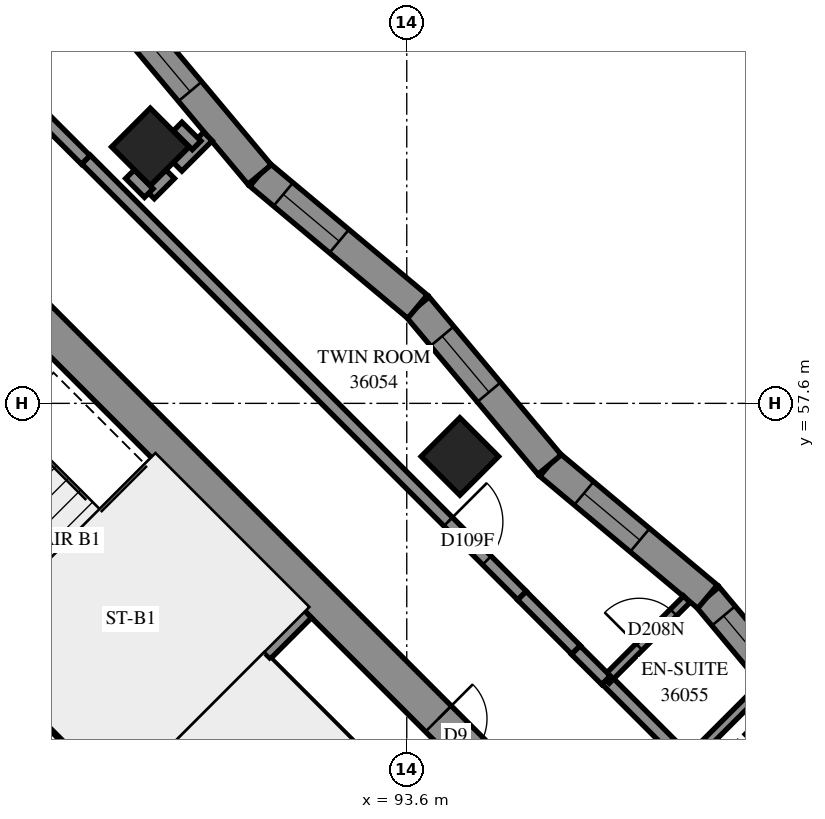
"""IFC4 building model, lengths in metres.
Left out: names, types, materials, properties, quantities, classifications, styles, units other than length and angle.
Written with IfcOpenShell. Run it as: python <this file> out.ifc"""

import sys

from ifc_helpers import new_model, si_unit, direction, frame, frame_2d, origin, origin_2d, place, context, subcontext, project, spatial, polyline, rectangle, outline, extrude, element, fill, save


model = new_model("IFC4")
c1 = context("Model", 3, precision=1e-05, world=origin(), true_north=direction((0.0, 1.0)))
c2 = subcontext(c1, "Body", "Model", "MODEL_VIEW")
j1 = project(units=[si_unit("LENGTHUNIT", "METRE"), si_unit("PLANEANGLEUNIT", "RADIAN")], contexts=[c1])
p1 = place(None, origin())
s1 = spatial("IfcSite", under=j1, at=p1, CompositionType="ELEMENT")
p2 = place(p1, origin())
s2 = spatial("IfcBuilding", under=s1, at=p2, CompositionType="ELEMENT")
p3 = place(p2, frame((0.0, 0.0, 135.4)))
s3 = spatial("IfcBuildingStorey", under=s2, at=p3, CompositionType="ELEMENT", Elevation=135.4)
for number, where, z_axis, x_axis in (
    (1, (89.382, 61.818, 0.0), (0.0, 0.0, 1.0), (0.707, -0.707, 0.0)),
    (2, (94.474, 56.727, 0.0), (0.0, 0.0, 1.0), (0.707, -0.707, 0.0)),
    (3, (99.565, 51.635, 0.0), (0.0, 0.0, 1.0), (0.707, -0.707, 0.0)),
):
    element("IfcColumn", number, at=place(p3, frame(where, z_axis=z_axis, x_axis=x_axis)), inside=s3, PredefinedType="COLUMN", context=c2, shape_type="SweptSolid", body=[
        extrude(rectangle(XDim=0.9, YDim=0.9, at=origin_2d()), origin(), (0.0, 0.0, 1.0), 3.1),
    ])
p4 = place(p3, frame((86.625, 59.908, -0.3), z_axis=(0.0, 0.0, 1.0), x_axis=(0.7071067812, -0.7071067812, 0.0)))
e4 = element("IfcWall", 4, at=p4, inside=s3, PredefinedType="SHEAR", context=c2, shape_type="SweptSolid", body=[
    extrude(rectangle(XDim=15.6, YDim=0.6, at=frame_2d((7.8, 0.0))), origin(), (0.0, 0.0, 1.0), 2.7),
])
p5 = place(p4, frame((10.6, 0.0, 0.3)))
e5 = element("IfcOpeningElement", 5, at=p5, cuts=e4, PredefinedType="OPENING", context=c2, shape_type="SweptSolid", body=[
    extrude(rectangle(XDim=0.8, YDim=2.1, at=frame_2d((0.4, 1.05))), frame((0.0, 0.31, 0.0), z_axis=(0.0, -1.0, 0.0), x_axis=(1.0, 0.0, 0.0)), (0.0, 0.0, 1.0), 0.62),
])
p6 = place(p3, frame((81.534, 53.969, 0.0), z_axis=(0.0, 0.0, 1.0), x_axis=(0.707103309, -0.7071102534, 0.0)))
e6 = element("IfcWall", 6, at=p6, inside=s3, PredefinedType="SOLIDWALL", context=c2, shape_type="SweptSolid", body=[
    extrude(rectangle(XDim=14.4, YDim=0.3, at=frame_2d((7.2, 0.0))), origin(), (0.0, 0.0, 1.0), 3.1),
])
p7 = place(p6, frame((1.25, 0.0, 0.0)))
e7 = element("IfcOpeningElement", 7, at=p7, cuts=e6, PredefinedType="OPENING", context=c2, shape_type="SweptSolid", body=[
    extrude(rectangle(XDim=1.1, YDim=2.1, at=frame_2d((0.55, 1.05))), frame((0.0, 0.16, 0.0), z_axis=(0.0, -1.0, 0.0), x_axis=(1.0, 0.0, 0.0)), (0.0, 0.0, 1.0), 0.32),
])
p8 = place(p6, frame((4.85, 0.0, 0.0)))
e8 = element("IfcOpeningElement", 8, at=p8, cuts=e6, PredefinedType="OPENING", context=c2, shape_type="SweptSolid", body=[
    extrude(rectangle(XDim=1.1, YDim=2.1, at=frame_2d((0.55, 1.05))), frame((0.0, 0.16, 0.0), z_axis=(0.0, -1.0, 0.0), x_axis=(1.0, 0.0, 0.0)), (0.0, 0.0, 1.0), 0.32),
])
p9 = place(p6, frame((8.45, 0.0, 0.0)))
e9 = element("IfcOpeningElement", 9, at=p9, cuts=e6, PredefinedType="OPENING", context=c2, shape_type="SweptSolid", body=[
    extrude(rectangle(XDim=1.1, YDim=2.1, at=frame_2d((0.55, 1.05))), frame((0.0, 0.16, 0.0), z_axis=(0.0, -1.0, 0.0), x_axis=(1.0, 0.0, 0.0)), (0.0, 0.0, 1.0), 0.32),
])
p10 = place(p6, frame((12.05, 0.0, 0.0)))
e10 = element("IfcOpeningElement", 10, at=p10, cuts=e6, PredefinedType="OPENING", context=c2, shape_type="SweptSolid", body=[
    extrude(rectangle(XDim=1.1, YDim=2.1, at=frame_2d((0.55, 1.05))), frame((0.0, 0.16, 0.0), z_axis=(0.0, -1.0, 0.0), x_axis=(1.0, 0.0, 0.0)), (0.0, 0.0, 1.0), 0.32),
])
p11 = place(p3, frame((83.867, 56.302, 0.0), z_axis=(0.0, 0.0, 1.0), x_axis=(0.7071137256, -0.7070998367, 0.0)))
e11 = element("IfcWall", 11, at=p11, inside=s3, PredefinedType="SOLIDWALL", context=c2, shape_type="SweptSolid", body=[
    extrude(rectangle(XDim=7.2, YDim=0.3, at=frame_2d((3.6, 0.0))), origin(), (0.0, 0.0, 1.0), 3.1),
])
p12 = place(p3, frame((88.958, 51.211, 0.0), z_axis=(0.0, 0.0, 1.0), x_axis=(0.7071067812, 0.7071067812, 0.0)))
e12 = element("IfcWall", 12, at=p12, inside=s3, PredefinedType="SOLIDWALL", context=c2, shape_type="SweptSolid", body=[
    extrude(rectangle(XDim=4.2, YDim=0.3, at=frame_2d((2.1, 0.0))), origin(), (0.0, 0.0, 1.0), 3.1),
])
p13 = place(p3, frame((100.718, 51.824, 0.0), z_axis=(0.0, 0.0, 1.0), x_axis=(-0.6416676788, 0.7669827834, 0.0)))
e13 = element("IfcWall", 13, at=p13, inside=s3, PredefinedType="SOLIDWALL", context=c2, shape_type="SweptSolid", body=[
    extrude(outline(polyline([(0.022, -0.25), (3.408, -0.25), (3.364, 0.25), (-0.022, 0.25), (0.022, -0.25)])), origin(), (0.0, 0.0, 1.0), 3.1),
])
p14 = place(p13, frame((1.774, 0.0, 0.45)))
e14 = element("IfcOpeningElement", 14, at=p14, cuts=e13, PredefinedType="OPENING", context=c2, shape_type="SweptSolid", body=[
    extrude(rectangle(XDim=1.2, YDim=2.5, at=frame_2d((0.6, 1.25))), frame((0.0, 0.26, 0.0), z_axis=(0.0, -1.0, 0.0), x_axis=(1.0, 0.0, 0.0)), (0.0, 0.0, 1.0), 0.52),
])
p15 = place(p3, frame((98.546, 54.421, 0.0), z_axis=(0.0, 0.0, 1.0), x_axis=(-0.7669706225, 0.6416822144, 0.0)))
e15 = element("IfcWall", 15, at=p15, inside=s3, PredefinedType="SOLIDWALL", context=c2, shape_type="SweptSolid", body=[
    extrude(outline(polyline([(-0.022, -0.25), (3.364, -0.25), (3.408, 0.25), (0.022, 0.25), (-0.022, -0.25)])), origin(), (0.0, 0.0, 1.0), 3.1),
])
p16 = place(p15, frame((1.45, 0.0, 0.45)))
e16 = element("IfcOpeningElement", 16, at=p16, cuts=e15, PredefinedType="OPENING", context=c2, shape_type="SweptSolid", body=[
    extrude(rectangle(XDim=1.2, YDim=2.5, at=frame_2d((0.6, 1.25))), frame((0.0, 0.26, 0.0), z_axis=(0.0, -1.0, 0.0), x_axis=(1.0, 0.0, 0.0)), (0.0, 0.0, 1.0), 0.52),
])
p17 = place(p3, frame((95.949, 56.593, 0.0), z_axis=(0.0, 0.0, 1.0), x_axis=(-0.6416822144, 0.7669706225, 0.0)))
e17 = element("IfcWall", 17, at=p17, inside=s3, PredefinedType="SOLIDWALL", context=c2, shape_type="SweptSolid", body=[
    extrude(outline(polyline([(0.022, -0.25), (3.408, -0.25), (3.364, 0.25), (-0.022, 0.25), (0.022, -0.25)])), origin(), (0.0, 0.0, 1.0), 3.1),
])
p18 = place(p17, frame((1.553, 0.0, 0.45)))
e18 = element("IfcOpeningElement", 18, at=p18, cuts=e17, PredefinedType="OPENING", context=c2, shape_type="SweptSolid", body=[
    extrude(rectangle(XDim=1.2, YDim=2.5, at=frame_2d((0.6, 1.25))), frame((0.0, 0.26, 0.0), z_axis=(0.0, -1.0, 0.0), x_axis=(1.0, 0.0, 0.0)), (0.0, 0.0, 1.0), 0.52),
])
p19 = place(p3, frame((93.776, 59.19, 0.0), z_axis=(0.0, 0.0, 1.0), x_axis=(-0.7669706225, 0.6416822144, 0.0)))
e19 = element("IfcWall", 19, at=p19, inside=s3, PredefinedType="SOLIDWALL", context=c2, shape_type="SweptSolid", body=[
    extrude(outline(polyline([(-0.022, -0.25), (3.364, -0.25), (3.408, 0.25), (0.022, 0.25), (-0.022, -0.25)])), origin(), (0.0, 0.0, 1.0), 3.1),
])
p20 = place(p19, frame((1.678, 0.0, 0.45)))
e20 = element("IfcOpeningElement", 20, at=p20, cuts=e19, PredefinedType="OPENING", context=c2, shape_type="SweptSolid", body=[
    extrude(rectangle(XDim=1.2, YDim=2.5, at=frame_2d((0.6, 1.25))), frame((0.0, 0.26, 0.0), z_axis=(0.0, -1.0, 0.0), x_axis=(1.0, 0.0, 0.0)), (0.0, 0.0, 1.0), 0.52),
])
p21 = place(p3, frame((91.18, 61.363, 0.0), z_axis=(0.0, 0.0, 1.0), x_axis=(-0.6416822144, 0.7669706225, 0.0)))
e21 = element("IfcWall", 21, at=p21, inside=s3, PredefinedType="SOLIDWALL", context=c2, shape_type="SweptSolid", body=[
    extrude(outline(polyline([(0.022, -0.25), (3.408, -0.25), (3.364, 0.25), (-0.022, 0.25), (0.022, -0.25)])), origin(), (0.0, 0.0, 1.0), 3.1),
])
p22 = place(p21, frame((1.781, 0.0, 0.45)))
e22 = element("IfcOpeningElement", 22, at=p22, cuts=e21, PredefinedType="OPENING", context=c2, shape_type="SweptSolid", body=[
    extrude(rectangle(XDim=1.2, YDim=2.5, at=frame_2d((0.6, 1.25))), frame((0.0, 0.26, 0.0), z_axis=(0.0, -1.0, 0.0), x_axis=(1.0, 0.0, 0.0)), (0.0, 0.0, 1.0), 0.52),
])
p23 = place(p3, frame((91.313, 53.354, 0.0), z_axis=(0.0, 0.0, 1.0), x_axis=(0.7071140275, -0.7070995348, 0.0)))
e23 = element("IfcWall", 23, at=p23, inside=s3, PredefinedType="PARTITIONING", context=c2, shape_type="SweptSolid", body=[
    extrude(rectangle(XDim=6.9, YDim=0.15, at=frame_2d((3.45, 0.0))), origin(), (0.0, 0.0, 1.0), 3.1),
])
p24 = place(p3, frame((88.326, 61.609, 0.0), z_axis=(0.0, 0.0, 1.0), x_axis=(0.7071067812, -0.7071067812, 0.0)))
e24 = element("IfcWall", 24, at=p24, inside=s3, PredefinedType="PARTITIONING", context=c2, shape_type="SweptSolid", body=[
    extrude(rectangle(XDim=10.14, YDim=0.2, at=frame_2d((5.07, 0.0))), origin(), (0.0, 0.0, 1.0), 3.1),
])
p25 = place(p24, frame((8.422, 0.0, 0.0)))
e25 = element("IfcOpeningElement", 25, at=p25, cuts=e24, PredefinedType="OPENING", context=c2, shape_type="SweptSolid", body=[
    extrude(rectangle(XDim=0.9, YDim=2.1, at=frame_2d((0.45, 1.05))), frame((0.0, 0.11, 0.0), z_axis=(0.0, -1.0, 0.0), x_axis=(1.0, 0.0, 0.0)), (0.0, 0.0, 1.0), 0.22),
])
p26 = place(p3, frame((86.834, 63.088, 0.0), z_axis=(0.0, 0.0, 1.0), x_axis=(0.7075827869, -0.7066304548, 0.0)))
e26 = element("IfcWall", 26, at=p26, inside=s3, PredefinedType="PARTITIONING", context=c2, shape_type="SweptSolid", body=[
    extrude(rectangle(XDim=2.1, YDim=0.2, at=frame_2d((1.05, 0.0))), origin(), (0.0, 0.0, 1.0), 3.1),
])
p27 = place(p3, frame((96.882, 53.053, 0.0), z_axis=(0.0, 0.0, 1.0), x_axis=(0.7071067812, -0.7071067812, 0.0)))
e27 = element("IfcWall", 27, at=p27, inside=s3, PredefinedType="PARTITIONING", context=c2, shape_type="SweptSolid", body=[
    extrude(rectangle(XDim=1.901, YDim=0.2, at=frame_2d((0.95, 0.0))), origin(), (0.0, 0.0, 1.0), 3.1),
])
p28 = place(p3, frame((96.877, 53.051, 0.0), z_axis=(0.0, 0.0, 1.0), x_axis=(0.7071333947, 0.7070801667, 0.0)))
e28 = element("IfcWall", 28, at=p28, inside=s3, PredefinedType="PARTITIONING", context=c2, shape_type="SweptSolid", body=[
    extrude(rectangle(XDim=1.879, YDim=0.15, at=frame_2d((0.939, 0.0))), origin(), (0.0, 0.0, 1.0), 3.1),
])
p29 = place(p28, frame((0.77, 0.0, 0.0)))
e29 = element("IfcOpeningElement", 29, at=p29, cuts=e28, PredefinedType="OPENING", context=c2, shape_type="SweptSolid", body=[
    extrude(rectangle(XDim=0.8, YDim=2.1, at=frame_2d((0.4, 1.05))), frame((0.0, 0.085, 0.0), z_axis=(0.0, -1.0, 0.0), x_axis=(1.0, 0.0, 0.0)), (0.0, 0.0, 1.0), 0.17),
])
p30 = place(p3, frame((98.221, 51.707, 0.0), z_axis=(0.0, 0.0, 1.0), x_axis=(0.7071353957, 0.7070781655, 0.0)))
e30 = element("IfcWall", 30, at=p30, inside=s3, PredefinedType="PARTITIONING", context=c2, shape_type="SweptSolid", body=[
    extrude(rectangle(XDim=1.747, YDim=0.15, at=frame_2d((0.874, 0.0))), origin(), (0.0, 0.0, 1.0), 3.1),
])
p31 = place(p3, frame((95.494, 54.438, 0.0), z_axis=(0.0, 0.0, 1.0), x_axis=(0.706312726, -0.7078999456, 0.0)))
e31 = element("IfcWall", 31, at=p31, inside=s3, PredefinedType="PARTITIONING", context=c2, shape_type="SweptSolid", body=[
    extrude(rectangle(XDim=1.26, YDim=0.2, at=frame_2d((0.63, 0.0))), origin(), (0.0, 0.0, 1.0), 3.1),
])
p32 = place(p3, frame((96.38, 53.542, 0.0), z_axis=(0.0, 0.0, 1.0), x_axis=(0.7085338339, -0.7056768426, 0.0)))
e32 = element("IfcWall", 32, at=p32, inside=s3, PredefinedType="PARTITIONING", context=c2, shape_type="SweptSolid", body=[
    extrude(rectangle(XDim=0.7, YDim=0.2, at=frame_2d((0.35, 0.0))), origin(), (0.0, 0.0, 1.0), 3.1),
])
p33 = place(p3, frame((89.831, 61.491, 0.0), z_axis=(0.0, 0.0, 1.0), x_axis=(0.7071777367, 0.7070358186, 0.0)))
e33 = element("IfcWall", 33, at=p33, inside=s3, PredefinedType="PARTITIONING", context=c2, shape_type="SweptSolid", body=[
    extrude(rectangle(XDim=0.705, YDim=0.2, at=frame_2d((0.352, 0.0))), origin(), (0.0, 0.0, 1.0), 3.1),
])
p34 = place(p3, frame((89.377, 61.037, 0.0), z_axis=(0.0, 0.0, 1.0), x_axis=(0.7071067812, 0.7071067812, 0.0)))
e34 = element("IfcWall", 34, at=p34, inside=s3, PredefinedType="PARTITIONING", context=c2, shape_type="SweptSolid", body=[
    extrude(rectangle(XDim=0.469, YDim=0.2, at=frame_2d((0.235, 0.0))), origin(), (0.0, 0.0, 1.0), 3.1),
])
for number, where, z_axis, x_axis in (
    (35, (89.832, 62.153, 0.0), (0.0, 0.0, 1.0), (0.709, -0.705, 0.0)),
    (36, (89.049, 61.369, 0.0), (0.0, 0.0, 1.0), (0.705, -0.709, 0.0)),
):
    element("IfcWall", number, at=place(p3, frame(where, z_axis=z_axis, x_axis=x_axis)), inside=s3, PredefinedType="PARTITIONING", context=c2, shape_type="SweptSolid", body=[
        extrude(rectangle(XDim=0.438, YDim=0.2, at=frame_2d((0.219, 0.0))), origin(), (0.0, 0.0, 1.0), 3.1),
    ])
p35 = place(p3, frame((99.237, 52.087, 0.0), z_axis=(0.0, 0.0, 1.0), x_axis=(0.7071067812, 0.7071067812, 0.0)))
e37 = element("IfcWall", 37, at=p35, inside=s3, PredefinedType="PARTITIONING", context=c2, shape_type="SweptSolid", body=[
    extrude(rectangle(XDim=0.72, YDim=0.2, at=frame_2d((0.36, 0.0))), origin(), (0.0, 0.0, 1.0), 3.1),
])
p36 = place(p14, origin())
e38 = element("IfcWindow", 38, at=p36, inside=s3, PartitioningType="SINGLE_PANEL", PredefinedType="WINDOW", context=c2, shape_type="SweptSolid", body=[
    extrude(rectangle(XDim=1.2, YDim=2.5, at=frame_2d((0.6, 1.25))), frame((0.0, 0.18, 0.0), z_axis=(0.0, -1.0, 0.0), x_axis=(1.0, 0.0, 0.0)), (0.0, 0.0, 1.0), 0.06),
])
fill(e14, e38)
p37 = place(p16, origin())
e39 = element("IfcWindow", 39, at=p37, inside=s3, PartitioningType="SINGLE_PANEL", PredefinedType="WINDOW", context=c2, shape_type="SweptSolid", body=[
    extrude(rectangle(XDim=1.2, YDim=2.5, at=frame_2d((0.6, 1.25))), frame((0.0, 0.18, 0.0), z_axis=(0.0, -1.0, 0.0), x_axis=(1.0, 0.0, 0.0)), (0.0, 0.0, 1.0), 0.06),
])
fill(e16, e39)
p38 = place(p18, origin())
e40 = element("IfcWindow", 40, at=p38, inside=s3, PartitioningType="SINGLE_PANEL", PredefinedType="WINDOW", context=c2, shape_type="SweptSolid", body=[
    extrude(rectangle(XDim=1.2, YDim=2.5, at=frame_2d((0.6, 1.25))), frame((0.0, 0.18, 0.0), z_axis=(0.0, -1.0, 0.0), x_axis=(1.0, 0.0, 0.0)), (0.0, 0.0, 1.0), 0.06),
])
fill(e18, e40)
p39 = place(p20, origin())
e41 = element("IfcWindow", 41, at=p39, inside=s3, PartitioningType="SINGLE_PANEL", PredefinedType="WINDOW", context=c2, shape_type="SweptSolid", body=[
    extrude(rectangle(XDim=1.2, YDim=2.5, at=frame_2d((0.6, 1.25))), frame((0.0, 0.18, 0.0), z_axis=(0.0, -1.0, 0.0), x_axis=(1.0, 0.0, 0.0)), (0.0, 0.0, 1.0), 0.06),
])
fill(e20, e41)
p40 = place(p22, origin())
e42 = element("IfcWindow", 42, at=p40, inside=s3, PartitioningType="SINGLE_PANEL", PredefinedType="WINDOW", context=c2, shape_type="SweptSolid", body=[
    extrude(rectangle(XDim=1.2, YDim=2.5, at=frame_2d((0.6, 1.25))), frame((0.0, 0.18, 0.0), z_axis=(0.0, -1.0, 0.0), x_axis=(1.0, 0.0, 0.0)), (0.0, 0.0, 1.0), 0.06),
])
fill(e22, e42)
p41 = place(p5, origin())
e43 = element("IfcDoor", 43, at=p41, inside=s3, OperationType="SINGLE_SWING_RIGHT", PredefinedType="DOOR", context=c2, shape_type="SweptSolid", body=[
    extrude(rectangle(XDim=0.8, YDim=2.1, at=frame_2d((0.4, 1.05))), frame((0.0, 0.025, 0.0), z_axis=(0.0, -1.0, 0.0), x_axis=(1.0, 0.0, 0.0)), (0.0, 0.0, 1.0), 0.05),
])
fill(e5, e43)
p42 = place(p25, origin())
e44 = element("IfcDoor", 44, at=p42, inside=s3, OperationType="SINGLE_SWING_LEFT", PredefinedType="DOOR", context=c2, shape_type="SweptSolid", body=[
    extrude(rectangle(XDim=0.9, YDim=2.1, at=frame_2d((0.45, 1.05))), frame((0.0, 0.025, 0.0), z_axis=(0.0, -1.0, 0.0), x_axis=(1.0, 0.0, 0.0)), (0.0, 0.0, 1.0), 0.05),
])
fill(e25, e44)
p43 = place(p29, origin())
e45 = element("IfcDoor", 45, at=p43, inside=s3, OperationType="SINGLE_SWING_RIGHT", PredefinedType="DOOR", context=c2, shape_type="SweptSolid", body=[
    extrude(rectangle(XDim=0.8, YDim=2.1, at=frame_2d((0.4, 1.05))), frame((0.0, 0.025, 0.0), z_axis=(0.0, -1.0, 0.0), x_axis=(1.0, 0.0, 0.0)), (0.0, 0.0, 1.0), 0.05),
])
fill(e29, e45)
save(model, sys.argv[1])
